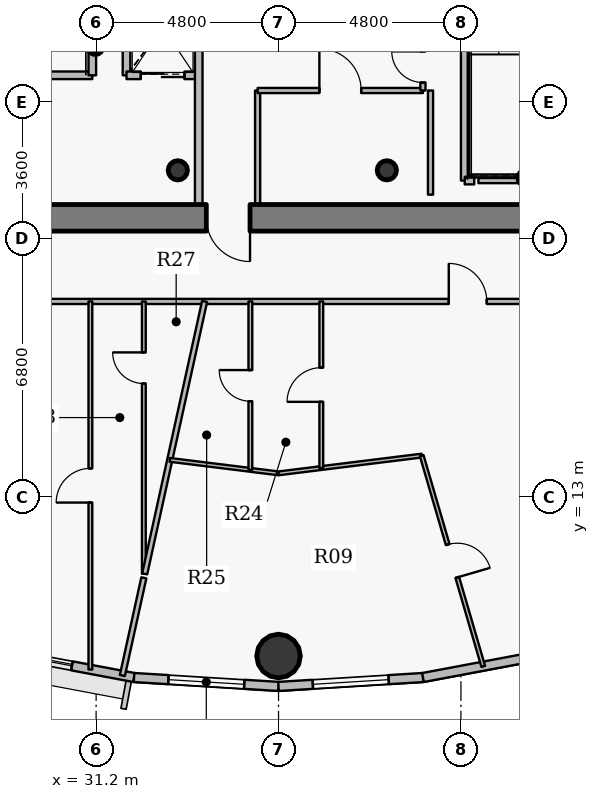
"""IFC4 building model, lengths in metres.
Left out: names, types, materials, properties, quantities, classifications, styles, units other than length and angle.
Written with IfcOpenShell. Run it as: python <this file> out.ifc"""

import sys

from ifc_helpers import new_model, si_unit, direction, frame, frame_2d, origin, origin_2d, place, context, subcontext, project, spatial, rectangle, hollow_circle, extrude, source, transform, mapped, element, fill, save


model = new_model("IFC4")
c1 = context("Model", 3, precision=1e-05, world=origin(), true_north=direction((0.0, 1.0)))
c2 = subcontext(c1, "Body", "Model", "MODEL_VIEW")
j1 = project(units=[si_unit("LENGTHUNIT", "METRE"), si_unit("PLANEANGLEUNIT", "RADIAN")], contexts=[c1])
p1 = place(None, origin())
s1 = spatial("IfcSite", under=j1, at=p1, CompositionType="ELEMENT")
p2 = place(p1, origin())
s2 = spatial("IfcBuilding", under=s1, at=p2, CompositionType="ELEMENT")
p3 = place(p2, frame((0.0, 0.0, 217.8)))
s3 = spatial("IfcBuildingStorey", under=s2, at=p3, CompositionType="ELEMENT", Elevation=217.8)
for number, where, z_axis, x_axis in (
    (1, (33.35, 21.6, 0.0), (0.0, 0.0, 1.0), (1.0, 0.0, 0.0)),
    (2, (38.85, 21.6, 0.0), (0.0, 0.0, 1.0), (1.0, 0.0, 0.0)),
):
    element("IfcColumn", number, at=place(p3, frame(where, z_axis=z_axis, x_axis=x_axis)), inside=s3, PredefinedType="COLUMN", context=c2, shape_type="SweptSolid", body=[
        extrude(hollow_circle(Radius=0.254, WallThickness=0.02, at=origin_2d()), origin(), (0.0, 0.0, 1.0), 3.75),
    ])
for number, where, z_axis, x_axis in (
    (3, (31.18, 24.85, 0.0), (0.0, 0.0, 1.0), (1.0, 0.0, 0.0)),
    (4, (42.5, 21.4, 0.0), (0.0, 0.0, 1.0), (1.0, 0.0, 0.0)),
):
    element("IfcColumn", number, at=place(p3, frame(where, z_axis=z_axis, x_axis=x_axis)), inside=s3, PredefinedType="COLUMN", context=c2, shape_type="SweptSolid", body=[
        extrude(hollow_circle(Radius=0.203, WallThickness=0.016, at=origin_2d()), origin(), (0.0, 0.0, 1.0), 3.75),
    ])
p4 = place(p3, frame((44.95, 20.35, 0.0), z_axis=(0.0, 0.0, 1.0), x_axis=(-1.0, 0.0, 0.0)))
e5 = element("IfcWall", 5, at=p4, inside=s3, PredefinedType="SHEAR", context=c2, shape_type="SweptSolid", body=[
    extrude(rectangle(XDim=17.9, YDim=0.7, at=frame_2d((8.95, 0.0))), origin(), (0.0, 0.0, 1.0), 3.05),
])
p5 = place(p4, frame((9.7, 0.0, 0.0)))
e6 = element("IfcOpeningElement", 6, at=p5, cuts=e5, PredefinedType="OPENING", context=c2, shape_type="SweptSolid", body=[
    extrude(rectangle(XDim=1.15, YDim=2.15, at=origin_2d()), frame((0.575, 0.36, 1.075), z_axis=(0.0, -1.0, 0.0), x_axis=(1.0, 0.0, 0.0)), (0.0, 0.0, 1.0), 0.72),
])
p6 = place(p3, frame((36.0, 8.82, 0.0), z_axis=(0.0, 0.0, 1.0), x_axis=(1.0, 0.0, 0.0)))
e7 = element("IfcColumn", 7, at=p6, inside=s3, PredefinedType="COLUMN", context=c2, shape_type="SweptSolid", body=[
    extrude(hollow_circle(Radius=0.575, WallThickness=0.036, at=origin_2d()), origin(), (0.0, 0.0, 1.0), 3.75),
])
p7 = place(p3, frame((32.198, 8.254, 0.0), z_axis=(0.0, 0.0, 1.0), x_axis=(-0.982784898575, 0.184753465822, 0.0)))
e8 = element("IfcWall", 8, at=p7, inside=s3, PredefinedType="SOLIDWALL", context=c2, shape_type="SweptSolid", body=[
    extrude(rectangle(XDim=3.773, YDim=0.24, at=frame_2d((1.886, 0.0))), origin(), (0.0, 0.0, 1.0), 3.5),
])
p8 = place(p7, frame((1.664, 0.0, 0.9)))
e9 = element("IfcOpeningElement", 9, at=p8, cuts=e8, PredefinedType="OPENING", context=c2, shape_type="SweptSolid", body=[
    extrude(rectangle(XDim=1.25, YDim=1.65, at=origin_2d()), frame((0.625, 0.13, 0.825), z_axis=(0.0, -1.0, 0.0), x_axis=(1.0, 0.0, 0.0)), (0.0, 0.0, 1.0), 0.26),
])
p9 = place(p3, frame((36.0, 8.02, 0.0), z_axis=(0.0, 0.0, 1.0), x_axis=(-0.998108785312, 0.06147237333, 0.0)))
e10 = element("IfcWall", 10, at=p9, inside=s3, PredefinedType="SOLIDWALL", context=c2, shape_type="SweptSolid", body=[
    extrude(rectangle(XDim=3.809, YDim=0.24, at=frame_2d((1.904, 0.0))), origin(), (0.0, 0.0, 1.0), 3.5),
])
p10 = place(p9, frame((0.904, 0.0, 0.9)))
e11 = element("IfcOpeningElement", 11, at=p10, cuts=e10, PredefinedType="OPENING", context=c2, shape_type="SweptSolid", body=[
    extrude(rectangle(XDim=2.0, YDim=1.75, at=origin_2d()), frame((1.0, 0.13, 0.875), z_axis=(0.0, -1.0, 0.0), x_axis=(1.0, 0.0, 0.0)), (0.0, 0.0, 1.0), 0.26),
])
p11 = place(p3, frame((39.802, 8.254, 0.0), z_axis=(0.0, 0.0, 1.0), x_axis=(-0.998108785312, -0.06147237333, 0.0)))
e12 = element("IfcWall", 12, at=p11, inside=s3, PredefinedType="SOLIDWALL", context=c2, shape_type="SweptSolid", body=[
    extrude(rectangle(XDim=3.809, YDim=0.24, at=frame_2d((1.904, 0.0))), origin(), (0.0, 0.0, 1.0), 3.5),
])
p12 = place(p11, frame((0.905, 0.0, 0.9)))
e13 = element("IfcOpeningElement", 13, at=p12, cuts=e12, PredefinedType="OPENING", context=c2, shape_type="SweptSolid", body=[
    extrude(rectangle(XDim=2.0, YDim=1.75, at=origin_2d()), frame((1.0, 0.13, 0.875), z_axis=(0.0, -1.0, 0.0), x_axis=(1.0, 0.0, 0.0)), (0.0, 0.0, 1.0), 0.26),
])
p13 = place(p3, frame((43.509, 8.951, 0.0), z_axis=(0.0, 0.0, 1.0), x_axis=(-0.982784898575, -0.184753465822, 0.0)))
e14 = element("IfcWall", 14, at=p13, inside=s3, PredefinedType="SOLIDWALL", context=c2, shape_type="SweptSolid", body=[
    extrude(rectangle(XDim=3.773, YDim=0.24, at=frame_2d((1.886, 0.0))), origin(), (0.0, 0.0, 1.0), 3.5),
])
p14 = place(p3, frame((24.35, 18.15, 0.0), z_axis=(0.0, 0.0, 1.0), x_axis=(1.0, 0.0, 0.0)))
e15 = element("IfcWall", 15, at=p14, inside=s3, PredefinedType="PARTITIONING", context=c2, shape_type="SweptSolid", body=[
    extrude(rectangle(XDim=23.85, YDim=0.135, at=frame_2d((11.925, 0.0))), origin(), (0.0, 0.0, 1.0), 2.935),
])
p15 = place(p14, frame((2.87, 0.0, 0.0)))
e16 = element("IfcOpeningElement", 16, at=p15, cuts=e15, PredefinedType="OPENING", context=c2, shape_type="SweptSolid", body=[
    extrude(rectangle(XDim=1.0, YDim=2.15, at=origin_2d()), frame((0.5, 0.078, 1.075), z_axis=(0.0, -1.0, 0.0), x_axis=(1.0, 0.0, 0.0)), (0.0, 0.0, 1.0), 0.155),
])
p16 = place(p14, frame((16.13, 0.0, 0.0)))
e17 = element("IfcOpeningElement", 17, at=p16, cuts=e15, PredefinedType="OPENING", context=c2, shape_type="SweptSolid", body=[
    extrude(rectangle(XDim=1.0, YDim=2.15, at=origin_2d()), frame((0.5, 0.078, 1.075), z_axis=(0.0, -1.0, 0.0), x_axis=(1.0, 0.0, 0.0)), (0.0, 0.0, 1.0), 0.155),
])
p17 = place(p3, frame((27.56, 24.1, 0.0), z_axis=(0.0, 0.0, 1.0), x_axis=(1.0, 0.0, 0.0)))
e18 = element("IfcWall", 18, at=p17, inside=s3, PredefinedType="PARTITIONING", context=c2, shape_type="SweptSolid", body=[
    extrude(rectangle(XDim=3.54, YDim=0.2, at=frame_2d((1.77, 0.0))), origin(), (0.0, 0.0, 1.0), 3.5),
])
p18 = place(p17, frame((1.17, 0.0, 0.0)))
e19 = element("IfcOpeningElement", 19, at=p18, cuts=e18, PredefinedType="OPENING", context=c2, shape_type="SweptSolid", body=[
    extrude(rectangle(XDim=1.2, YDim=2.15, at=origin_2d()), frame((0.6, 0.11, 1.075), z_axis=(0.0, -1.0, 0.0), x_axis=(1.0, 0.0, 0.0)), (0.0, 0.0, 1.0), 0.22),
])
p19 = place(p3, frame((31.049, 8.465, 0.0), z_axis=(0.0, 0.0, 1.0), x_axis=(0.0, 1.0, 0.0)))
e20 = element("IfcWall", 20, at=p19, inside=s3, PredefinedType="PARTITIONING", context=c2, shape_type="SweptSolid", body=[
    extrude(rectangle(XDim=9.685, YDim=0.1, at=frame_2d((4.842, 0.0))), origin(), (0.0, 0.0, 1.0), 2.985),
])
p20 = place(p19, frame((4.392, 0.0, 0.0)))
e21 = element("IfcOpeningElement", 21, at=p20, cuts=e20, PredefinedType="OPENING", context=c2, shape_type="SweptSolid", body=[
    extrude(rectangle(XDim=0.9, YDim=2.1, at=origin_2d()), frame((0.45, 0.06, 1.05), z_axis=(0.0, -1.0, 0.0), x_axis=(1.0, 0.0, 0.0)), (0.0, 0.0, 1.0), 0.12),
])
p21 = place(p3, frame((31.1, 24.1, 0.0), z_axis=(0.0, 0.0, 1.0), x_axis=(0.0, 1.0, 0.0)))
e22 = element("IfcWall", 22, at=p21, inside=s3, PredefinedType="PARTITIONING", context=c2, shape_type="SweptSolid", body=[
    extrude(rectangle(XDim=1.44, YDim=0.2, at=frame_2d((0.72, 0.0))), origin(), (0.0, 0.0, 1.0), 3.5),
])
p22 = place(p3, frame((31.891, 8.307, 0.0), z_axis=(0.0, 0.0, 1.0), x_axis=(0.214700779338, 0.976679873526, 0.0)))
e23 = element("IfcWall", 23, at=p22, inside=s3, PredefinedType="PARTITIONING", context=c2, shape_type="SweptSolid", body=[
    extrude(rectangle(XDim=2.632, YDim=0.135, at=frame_2d((1.316, 0.0))), origin(), (0.0, 0.0, 1.0), 2.985),
])
p23 = place(p3, frame((32.0, 24.1, 0.0), z_axis=(0.0, 0.0, 1.0), x_axis=(0.0, 1.0, 0.0)))
e24 = element("IfcWall", 24, at=p23, inside=s3, PredefinedType="PARTITIONING", context=c2, shape_type="SweptSolid", body=[
    extrude(rectangle(XDim=8.0, YDim=0.2, at=frame_2d((4.0, 0.0))), origin(), (0.0, 0.0, 1.0), 3.5),
])
p24 = place(p3, frame((32.0, 24.1, 0.0), z_axis=(0.0, 0.0, 1.0), x_axis=(1.0, 0.0, 0.0)))
e25 = element("IfcWall", 25, at=p24, inside=s3, PredefinedType="PARTITIONING", context=c2, shape_type="SweptSolid", body=[
    extrude(rectangle(XDim=1.9, YDim=0.2, at=frame_2d((0.95, 0.0))), origin(), (0.0, 0.0, 1.0), 3.085),
])
p25 = place(p24, frame((0.375, 0.0, 0.0)))
e26 = element("IfcOpeningElement", 26, at=p25, cuts=e25, PredefinedType="OPENING", context=c2, shape_type="SweptSolid", body=[
    extrude(rectangle(XDim=1.15, YDim=2.15, at=origin_2d()), frame((0.575, 0.11, 1.075), z_axis=(0.0, -1.0, 0.0), x_axis=(1.0, 0.0, 0.0)), (0.0, 0.0, 1.0), 0.22),
])
p26 = place(p3, frame((32.456, 10.985, 0.0), z_axis=(0.0, 0.0, 1.0), x_axis=(0.0, 1.0, 0.0)))
e27 = element("IfcWall", 27, at=p26, inside=s3, PredefinedType="PARTITIONING", context=c2, shape_type="SweptSolid", body=[
    extrude(rectangle(XDim=7.165, YDim=0.1, at=frame_2d((3.582, 0.0))), origin(), (0.0, 0.0, 1.0), 3.5),
])
p27 = place(p26, frame((5.004, 0.0, 0.0)))
e28 = element("IfcOpeningElement", 28, at=p27, cuts=e27, PredefinedType="OPENING", context=c2, shape_type="SweptSolid", body=[
    extrude(rectangle(XDim=0.82, YDim=2.1, at=origin_2d()), frame((0.41, 0.06, 1.05), z_axis=(0.0, -1.0, 0.0), x_axis=(1.0, 0.0, 0.0)), (0.0, 0.0, 1.0), 0.12),
])
p28 = place(p3, frame((32.479, 10.983, 0.0), z_axis=(0.0, 0.0, 1.0), x_axis=(0.214685976808, 0.976683127407, 0.0)))
e29 = element("IfcWall", 29, at=p28, inside=s3, PredefinedType="PARTITIONING", context=c2, shape_type="SweptSolid", body=[
    extrude(rectangle(XDim=7.338, YDim=0.135, at=frame_2d((3.669, 0.0))), origin(), (0.0, 0.0, 1.0), 3.5),
])
p29 = place(p3, frame((33.138, 13.981, 0.0), z_axis=(0.0, 0.0, 1.0), x_axis=(0.99239465631, -0.123096897311, 0.0)))
e30 = element("IfcWall", 30, at=p29, inside=s3, PredefinedType="PARTITIONING", context=c2, shape_type="SweptSolid", body=[
    extrude(rectangle(XDim=2.884, YDim=0.1, at=frame_2d((1.442, 0.0))), origin(), (0.0, 0.0, 1.0), 2.935),
])
p30 = place(p3, frame((33.9, 20.7, 0.0), z_axis=(0.0, 0.0, 1.0), x_axis=(0.0, 1.0, 0.0)))
e31 = element("IfcWall", 31, at=p30, inside=s3, PredefinedType="PARTITIONING", context=c2, shape_type="SweptSolid", body=[
    extrude(rectangle(XDim=11.4, YDim=0.2, at=frame_2d((5.7, 0.0))), origin(), (0.0, 0.0, 1.0), 3.085),
])
p31 = place(p30, frame((7.08, 0.0, 0.0)))
e32 = element("IfcOpeningElement", 32, at=p31, cuts=e31, PredefinedType="OPENING", context=c2, shape_type="SweptSolid", body=[
    extrude(rectangle(XDim=1.05, YDim=2.15, at=origin_2d()), frame((0.525, 0.11, 1.075), z_axis=(0.0, -1.0, 0.0), x_axis=(1.0, 0.0, 0.0)), (0.0, 0.0, 1.0), 0.22),
])
p32 = place(p30, frame((8.595, 0.0, 0.0)))
e33 = element("IfcOpeningElement", 33, at=p32, cuts=e31, PredefinedType="OPENING", context=c2, shape_type="SweptSolid", body=[
    extrude(rectangle(XDim=1.05, YDim=2.15, at=origin_2d()), frame((0.525, 0.11, 1.075), z_axis=(0.0, -1.0, 0.0), x_axis=(1.0, 0.0, 0.0)), (0.0, 0.0, 1.0), 0.22),
])
p33 = place(p30, frame((10.095, 0.0, 0.0)))
e34 = element("IfcOpeningElement", 34, at=p33, cuts=e31, PredefinedType="OPENING", context=c2, shape_type="SweptSolid", body=[
    extrude(rectangle(XDim=1.05, YDim=2.15, at=origin_2d()), frame((0.525, 0.11, 1.075), z_axis=(0.0, -1.0, 0.0), x_axis=(1.0, 0.0, 0.0)), (0.0, 0.0, 1.0), 0.22),
])
p34 = place(p3, frame((35.259, 13.718, 0.0), z_axis=(0.0, 0.0, 1.0), x_axis=(0.0, 1.0, 0.0)))
e35 = element("IfcWall", 35, at=p34, inside=s3, PredefinedType="PARTITIONING", context=c2, shape_type="SweptSolid", body=[
    extrude(rectangle(XDim=4.432, YDim=0.1, at=frame_2d((2.216, 0.0))), origin(), (0.0, 0.0, 1.0), 3.5),
])
p35 = place(p34, frame((1.806, 0.0, 0.0)))
e36 = element("IfcOpeningElement", 36, at=p35, cuts=e35, PredefinedType="OPENING", context=c2, shape_type="SweptSolid", body=[
    extrude(rectangle(XDim=0.82, YDim=2.1, at=origin_2d()), frame((0.41, 0.06, 1.05), z_axis=(0.0, -1.0, 0.0), x_axis=(1.0, 0.0, 0.0)), (0.0, 0.0, 1.0), 0.12),
])
p36 = place(p3, frame((35.45, 20.7, 0.0), z_axis=(0.0, 0.0, 1.0), x_axis=(0.0, 1.0, 0.0)))
e37 = element("IfcWall", 37, at=p36, inside=s3, PredefinedType="PARTITIONING", context=c2, shape_type="SweptSolid", body=[
    extrude(rectangle(XDim=3.0, YDim=0.135, at=frame_2d((1.5, 0.0))), origin(), (0.0, 0.0, 1.0), 3.085),
])
p37 = place(p3, frame((35.45, 23.7, 0.0), z_axis=(0.0, 0.0, 1.0), x_axis=(1.0, 0.0, 0.0)))
e38 = element("IfcWall", 38, at=p37, inside=s3, PredefinedType="PARTITIONING", context=c2, shape_type="SweptSolid", body=[
    extrude(rectangle(XDim=4.35, YDim=0.135, at=frame_2d((2.175, 0.0))), origin(), (0.0, 0.0, 1.0), 3.085),
])
p38 = place(p37, frame((1.625, 0.0, 0.0)))
e39 = element("IfcOpeningElement", 39, at=p38, cuts=e38, PredefinedType="OPENING", context=c2, shape_type="SweptSolid", body=[
    extrude(rectangle(XDim=1.1, YDim=2.15, at=origin_2d()), frame((0.55, 0.078, 1.075), z_axis=(0.0, -1.0, 0.0), x_axis=(1.0, 0.0, 0.0)), (0.0, 0.0, 1.0), 0.155),
])
p39 = place(p3, frame((36.0, 13.626, 0.0), z_axis=(0.0, 0.0, 1.0), x_axis=(0.992397118202, 0.123077048159, 0.0)))
e40 = element("IfcWall", 40, at=p39, inside=s3, PredefinedType="PARTITIONING", context=c2, shape_type="SweptSolid", body=[
    extrude(rectangle(XDim=3.797, YDim=0.1, at=frame_2d((1.898, 0.0))), origin(), (0.0, 0.0, 1.0), 2.935),
])
p40 = place(p3, frame((37.126, 13.766, 0.0), z_axis=(0.0, 0.0, 1.0), x_axis=(0.0, 1.0, 0.0)))
e41 = element("IfcWall", 41, at=p40, inside=s3, PredefinedType="PARTITIONING", context=c2, shape_type="SweptSolid", body=[
    extrude(rectangle(XDim=4.384, YDim=0.1, at=frame_2d((2.192, 0.0))), origin(), (0.0, 0.0, 1.0), 3.035),
])
p41 = place(p40, frame((1.742, 0.0, 0.0)))
e42 = element("IfcOpeningElement", 42, at=p41, cuts=e41, PredefinedType="OPENING", context=c2, shape_type="SweptSolid", body=[
    extrude(rectangle(XDim=0.9, YDim=2.1, at=origin_2d()), frame((0.45, 0.06, 1.05), z_axis=(0.0, -1.0, 0.0), x_axis=(1.0, 0.0, 0.0)), (0.0, 0.0, 1.0), 0.12),
])
p42 = place(p3, frame((39.768, 14.094, 0.0), z_axis=(0.0, 0.0, 1.0), x_axis=(0.280219030024, -0.959936089129, 0.0)))
e43 = element("IfcWall", 43, at=p42, inside=s3, PredefinedType="PARTITIONING", context=c2, shape_type="SweptSolid", body=[
    extrude(rectangle(XDim=5.778, YDim=0.1, at=frame_2d((2.889, 0.0))), origin(), (0.0, 0.0, 1.0), 2.985),
])
p43 = place(p42, frame((2.439, 0.0, 0.0)))
e44 = element("IfcOpeningElement", 44, at=p43, cuts=e43, PredefinedType="OPENING", context=c2, shape_type="SweptSolid", body=[
    extrude(rectangle(XDim=0.9, YDim=2.1, at=origin_2d()), frame((0.45, 0.06, 1.05), z_axis=(0.0, -1.0, 0.0), x_axis=(1.0, 0.0, 0.0)), (0.0, 0.0, 1.0), 0.12),
])
p44 = place(p3, frame((39.8, 23.7, 0.0), z_axis=(0.0, 0.0, 1.0), x_axis=(0.0, 1.0, 0.0)))
e45 = element("IfcWall", 45, at=p44, inside=s3, PredefinedType="PARTITIONING", context=c2, shape_type="SweptSolid", body=[
    extrude(rectangle(XDim=1.75, YDim=0.135, at=frame_2d((0.875, 0.0))), origin(), (0.0, 0.0, 1.0), 3.5),
])
p45 = place(p44, frame((0.21, 0.0, 0.0)))
e46 = element("IfcOpeningElement", 46, at=p45, cuts=e45, PredefinedType="OPENING", context=c2, shape_type="SweptSolid", body=[
    extrude(rectangle(XDim=0.82, YDim=2.1, at=origin_2d()), frame((0.41, 0.078, 1.05), z_axis=(0.0, -1.0, 0.0), x_axis=(1.0, 0.0, 0.0)), (0.0, 0.0, 1.0), 0.155),
])
p46 = place(p3, frame((40.9, 21.33, 0.0), z_axis=(0.0, 0.0, 1.0), x_axis=(0.0, 1.0, 0.0)))
e47 = element("IfcWall", 47, at=p46, inside=s3, PredefinedType="PARTITIONING", context=c2, shape_type="SweptSolid", body=[
    extrude(rectangle(XDim=5.91, YDim=0.2, at=frame_2d((2.955, 0.0))), origin(), (0.0, 0.0, 1.0), 3.035),
])
p47 = place(p3, frame((40.9, 21.33, 0.0), z_axis=(0.0, 0.0, 1.0), x_axis=(1.0, 0.0, 0.0)))
e48 = element("IfcWall", 48, at=p47, inside=s3, PredefinedType="PARTITIONING", context=c2, shape_type="SweptSolid", body=[
    extrude(rectangle(XDim=0.25, YDim=0.2, at=frame_2d((0.125, 0.0))), origin(), (0.0, 0.0, 1.0), 3.035),
])
p48 = place(p3, frame((44.08, 21.33, 0.0), z_axis=(0.0, 0.0, 1.0), x_axis=(-1.0, 0.0, 0.0)))
e49 = element("IfcWall", 49, at=p48, inside=s3, PredefinedType="PARTITIONING", context=c2, shape_type="SweptSolid", body=[
    extrude(rectangle(XDim=2.82, YDim=0.135, at=frame_2d((1.41, 0.0))), origin(), (0.0, 0.0, 1.0), 3.035),
])
p49 = place(p3, frame((40.0, 23.7, 0.0), z_axis=(0.0, 0.0, 1.0), x_axis=(0.0, -1.0, 0.0)))
e50 = element("IfcWall", 50, at=p49, inside=s3, PredefinedType="PARTITIONING", context=c2, shape_type="SweptSolid", body=[
    extrude(rectangle(XDim=2.74, YDim=0.135, at=frame_2d((1.37, 0.0))), origin(), (0.0, 0.0, 1.0), 3.035),
])
m1 = source(origin(), c2, "Body", "SweptSolid", [
    extrude(rectangle(XDim=1.25, YDim=1.65, at=origin_2d()), frame((0.625, 0.03, 0.825), z_axis=(0.0, -1.0, 0.0), x_axis=(1.0, 0.0, 0.0)), (0.0, 0.0, 1.0), 0.06),
])
p50 = place(p8, origin())
e51 = element("IfcWindow", 51, at=p50, inside=s3, PartitioningType="SINGLE_PANEL", PredefinedType="WINDOW", context=c2, shape_type="MappedRepresentation", body=[
    mapped(m1, transform((0.0, 0.0, 0.0), x_axis=(1.0, 0.0, 0.0), y_axis=(0.0, 1.0, 0.0), z_axis=(0.0, 0.0, 1.0), scale=1.0)),
])
fill(e9, e51)
m2 = source(origin(), c2, "Body", "SweptSolid", [
    extrude(rectangle(XDim=2.0, YDim=1.75, at=origin_2d()), frame((1.0, 0.03, 0.875), z_axis=(0.0, -1.0, 0.0), x_axis=(1.0, 0.0, 0.0)), (0.0, 0.0, 1.0), 0.06),
])
p51 = place(p10, origin())
e52 = element("IfcWindow", 52, at=p51, inside=s3, PartitioningType="DOUBLE_PANEL_VERTICAL", PredefinedType="WINDOW", context=c2, shape_type="MappedRepresentation", body=[
    mapped(m2, transform((0.0, 0.0, 0.0), x_axis=(1.0, 0.0, 0.0), y_axis=(0.0, 1.0, 0.0), z_axis=(0.0, 0.0, 1.0), scale=1.0)),
])
fill(e11, e52)
p52 = place(p12, origin())
e53 = element("IfcWindow", 53, at=p52, inside=s3, PartitioningType="DOUBLE_PANEL_VERTICAL", PredefinedType="WINDOW", context=c2, shape_type="MappedRepresentation", body=[
    mapped(m2, transform((0.0, 0.0, 0.0), x_axis=(1.0, 0.0, 0.0), y_axis=(0.0, 1.0, 0.0), z_axis=(0.0, 0.0, 1.0), scale=1.0)),
])
fill(e13, e53)
m3 = source(origin(), c2, "Body", "SweptSolid", [
    extrude(rectangle(XDim=1.15, YDim=2.15, at=origin_2d()), frame((0.575, 0.025, 1.075), z_axis=(0.0, -1.0, 0.0), x_axis=(1.0, 0.0, 0.0)), (0.0, 0.0, 1.0), 0.05),
])
p53 = place(p5, origin())
e54 = element("IfcDoor", 54, at=p53, inside=s3, OperationType="SINGLE_SWING_LEFT", PredefinedType="DOOR", context=c2, shape_type="MappedRepresentation", body=[
    mapped(m3, transform((0.0, 0.0, 0.0), x_axis=(1.0, 0.0, 0.0), y_axis=(0.0, 1.0, 0.0), z_axis=(0.0, 0.0, 1.0), scale=1.0)),
])
fill(e6, e54)
m4 = source(origin(), c2, "Body", "SweptSolid", [
    extrude(rectangle(XDim=1.15, YDim=2.15, at=origin_2d()), frame((0.575, 0.025, 1.075), z_axis=(0.0, -1.0, 0.0), x_axis=(1.0, 0.0, 0.0)), (0.0, 0.0, 1.0), 0.05),
])
p54 = place(p25, origin())
e55 = element("IfcDoor", 55, at=p54, inside=s3, OperationType="DOUBLE_DOOR_SLIDING", PredefinedType="USERDEFINED", context=c2, shape_type="MappedRepresentation", body=[
    mapped(m4, transform((0.0, 0.0, 0.0), x_axis=(1.0, 0.0, 0.0), y_axis=(0.0, 1.0, 0.0), z_axis=(0.0, 0.0, 1.0), scale=1.0)),
])
fill(e26, e55)
m5 = source(origin(), c2, "Body", "SweptSolid", [
    extrude(rectangle(XDim=0.9, YDim=2.1, at=origin_2d()), frame((0.45, 0.025, 1.05), z_axis=(0.0, -1.0, 0.0), x_axis=(1.0, 0.0, 0.0)), (0.0, 0.0, 1.0), 0.05),
])
p55 = place(p20, origin())
e56 = element("IfcDoor", 56, at=p55, inside=s3, OperationType="SINGLE_SWING_LEFT", PredefinedType="DOOR", context=c2, shape_type="MappedRepresentation", body=[
    mapped(m5, transform((0.0, 0.0, 0.0), x_axis=(1.0, 0.0, 0.0), y_axis=(0.0, 1.0, 0.0), z_axis=(0.0, 0.0, 1.0), scale=1.0)),
])
fill(e21, e56)
m6 = source(origin(), c2, "Body", "SweptSolid", [
    extrude(rectangle(XDim=0.82, YDim=2.1, at=origin_2d()), frame((0.41, 0.025, 1.05), z_axis=(0.0, -1.0, 0.0), x_axis=(1.0, 0.0, 0.0)), (0.0, 0.0, 1.0), 0.05),
])
p56 = place(p27, origin())
e57 = element("IfcDoor", 57, at=p56, inside=s3, OperationType="SINGLE_SWING_RIGHT", PredefinedType="DOOR", context=c2, shape_type="MappedRepresentation", body=[
    mapped(m6, transform((0.0, 0.0, 0.0), x_axis=(1.0, 0.0, 0.0), y_axis=(0.0, 1.0, 0.0), z_axis=(0.0, 0.0, 1.0), scale=1.0)),
])
fill(e28, e57)
m7 = source(origin(), c2, "Body", "SweptSolid", [
    extrude(rectangle(XDim=1.0, YDim=2.15, at=origin_2d()), frame((0.5, 0.025, 1.075), z_axis=(0.0, -1.0, 0.0), x_axis=(1.0, 0.0, 0.0)), (0.0, 0.0, 1.0), 0.05),
])
p57 = place(p16, origin())
e58 = element("IfcDoor", 58, at=p57, inside=s3, OperationType="SINGLE_SWING_LEFT", PredefinedType="DOOR", context=c2, shape_type="MappedRepresentation", body=[
    mapped(m7, transform((0.0, 0.0, 0.0), x_axis=(1.0, 0.0, 0.0), y_axis=(0.0, 1.0, 0.0), z_axis=(0.0, 0.0, 1.0), scale=1.0)),
])
fill(e17, e58)
p58 = place(p43, origin())
e59 = element("IfcDoor", 59, at=p58, inside=s3, OperationType="SINGLE_SWING_RIGHT", PredefinedType="DOOR", context=c2, shape_type="MappedRepresentation", body=[
    mapped(m5, transform((0.0, 0.0, 0.0), x_axis=(1.0, 0.0, 0.0), y_axis=(0.0, 1.0, 0.0), z_axis=(0.0, 0.0, 1.0), scale=1.0)),
])
fill(e44, e59)
p59 = place(p41, origin())
e60 = element("IfcDoor", 60, at=p59, inside=s3, OperationType="SINGLE_SWING_LEFT", PredefinedType="DOOR", context=c2, shape_type="MappedRepresentation", body=[
    mapped(m5, transform((0.0, 0.0, 0.0), x_axis=(1.0, 0.0, 0.0), y_axis=(0.0, 1.0, 0.0), z_axis=(0.0, 0.0, 1.0), scale=1.0)),
])
fill(e42, e60)
p60 = place(p35, origin())
e61 = element("IfcDoor", 61, at=p60, inside=s3, OperationType="SINGLE_SWING_RIGHT", PredefinedType="DOOR", context=c2, shape_type="MappedRepresentation", body=[
    mapped(m6, transform((0.0, 0.0, 0.0), x_axis=(1.0, 0.0, 0.0), y_axis=(0.0, 1.0, 0.0), z_axis=(0.0, 0.0, 1.0), scale=1.0)),
])
fill(e36, e61)
m8 = source(origin(), c2, "Body", "SweptSolid", [
    extrude(rectangle(XDim=1.1, YDim=2.15, at=origin_2d()), frame((0.55, 0.025, 1.075), z_axis=(0.0, -1.0, 0.0), x_axis=(1.0, 0.0, 0.0)), (0.0, 0.0, 1.0), 0.05),
])
p61 = place(p38, origin())
e62 = element("IfcDoor", 62, at=p61, inside=s3, OperationType="SINGLE_SWING_LEFT", PredefinedType="DOOR", context=c2, shape_type="MappedRepresentation", body=[
    mapped(m8, transform((0.0, 0.0, 0.0), x_axis=(1.0, 0.0, 0.0), y_axis=(0.0, 1.0, 0.0), z_axis=(0.0, 0.0, 1.0), scale=1.0)),
])
fill(e39, e62)
p62 = place(p45, origin())
e63 = element("IfcDoor", 63, at=p62, inside=s3, OperationType="SINGLE_SWING_RIGHT", PredefinedType="DOOR", context=c2, shape_type="MappedRepresentation", body=[
    mapped(m6, transform((0.0, 0.0, 0.0), x_axis=(1.0, 0.0, 0.0), y_axis=(0.0, 1.0, 0.0), z_axis=(0.0, 0.0, 1.0), scale=1.0)),
])
fill(e46, e63)
save(model, sys.argv[1])
